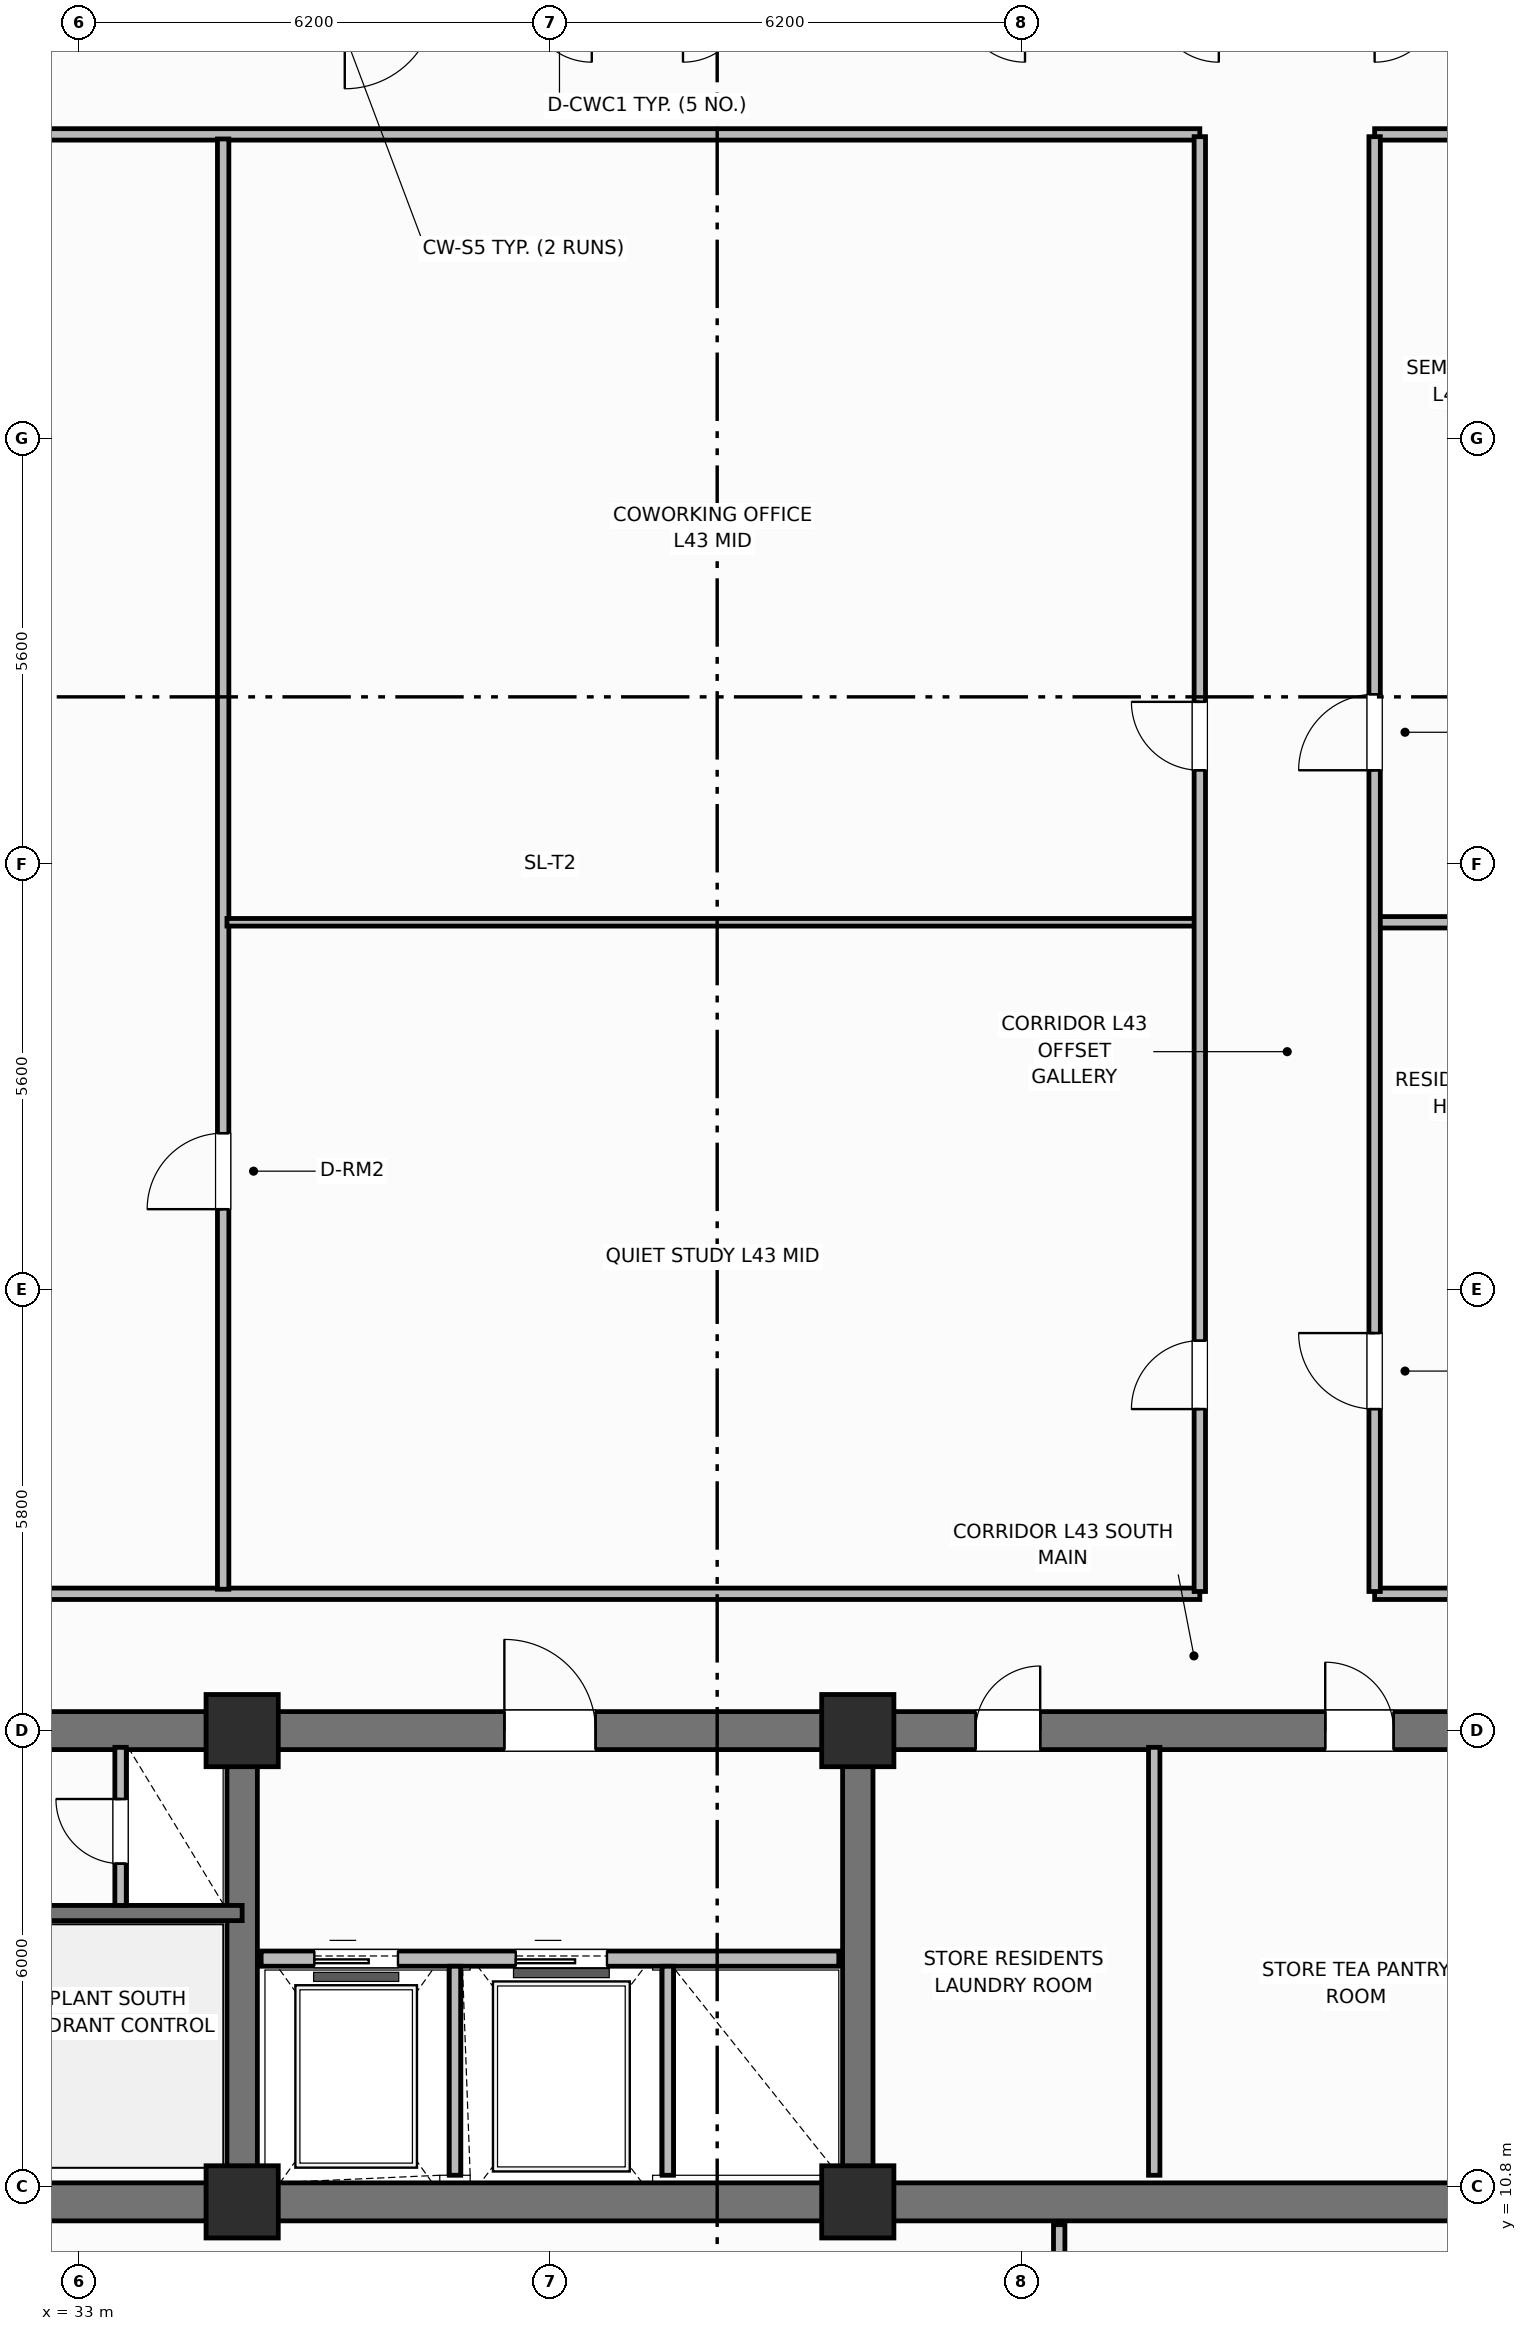
"""IFC4 building model, lengths in metres.
Left out: names, types, materials, properties, quantities, classifications, styles, units other than length and angle.
Written with IfcOpenShell. Run it as: python <this file> out.ifc"""

import sys

from ifc_helpers import new_model, si_unit, direction, frame, frame_2d, origin, origin_2d, place, context, subcontext, project, spatial, rectangle, extrude, element, fill, save


model = new_model("IFC4")
c1 = context("Model", 3, precision=1e-05, world=origin(), true_north=direction((0.0, 1.0)))
c2 = subcontext(c1, "Body", "Model", "MODEL_VIEW")
j1 = project(units=[si_unit("LENGTHUNIT", "METRE"), si_unit("PLANEANGLEUNIT", "RADIAN")], contexts=[c1])
p1 = place(None, origin())
s1 = spatial("IfcSite", under=j1, at=p1, CompositionType="ELEMENT")
p2 = place(p1, origin())
s2 = spatial("IfcBuilding", under=s1, at=p2, CompositionType="ELEMENT")
p3 = place(p2, frame((0.0, 0.0, 173.7)))
s3 = spatial("IfcBuildingStorey", under=s2, at=p3, CompositionType="ELEMENT", Elevation=173.7)
p4 = place(p3, frame((52.8, 10.6, 0.0), z_axis=(0.0, 0.0, 1.0), x_axis=(-1.0, 0.0, 0.0)))
e1 = element("IfcWall", 1, at=p4, inside=s3, PredefinedType="SHEAR", context=c2, shape_type="SweptSolid", body=[
    extrude(rectangle(XDim=27.2, YDim=0.5, at=frame_2d((13.6, 0.0))), origin(), (0.0, 0.0, 1.0), 3.7),
])
p5 = place(p3, frame((25.6, 16.8, 0.0), z_axis=(0.0, 0.0, 1.0), x_axis=(1.0, 0.0, 0.0)))
e2 = element("IfcWall", 2, at=p5, inside=s3, PredefinedType="SHEAR", context=c2, shape_type="SweptSolid", body=[
    extrude(rectangle(XDim=27.2, YDim=0.5, at=frame_2d((13.6, 0.0))), origin(), (0.0, 0.0, 1.0), 3.7),
])
p6 = place(p5, frame((1.8, 0.0, 0.0)))
e3 = element("IfcOpeningElement", 3, at=p6, cuts=e2, PredefinedType="OPENING", context=c2, shape_type="SweptSolid", body=[
    extrude(rectangle(XDim=1.1, YDim=2.15, at=frame_2d((0.55, 1.075))), frame((0.0, 0.26, 0.0), z_axis=(0.0, -1.0, 0.0), x_axis=(1.0, 0.0, 0.0)), (0.0, 0.0, 1.0), 0.52),
])
p7 = place(p5, frame((5.6, 0.0, 0.0)))
e4 = element("IfcOpeningElement", 4, at=p7, cuts=e2, PredefinedType="OPENING", context=c2, shape_type="SweptSolid", body=[
    extrude(rectangle(XDim=0.85, YDim=2.1, at=frame_2d((0.425, 1.05))), frame((0.0, 0.26, 0.0), z_axis=(0.0, -1.0, 0.0), x_axis=(1.0, 0.0, 0.0)), (0.0, 0.0, 1.0), 0.52),
])
p8 = place(p5, frame((13.0, 0.0, 0.0)))
e5 = element("IfcOpeningElement", 5, at=p8, cuts=e2, PredefinedType="OPENING", context=c2, shape_type="SweptSolid", body=[
    extrude(rectangle(XDim=1.2, YDim=2.15, at=frame_2d((0.6, 1.075))), frame((0.0, 0.26, 0.0), z_axis=(0.0, -1.0, 0.0), x_axis=(1.0, 0.0, 0.0)), (0.0, 0.0, 1.0), 0.52),
])
p9 = place(p5, frame((19.2, 0.0, 0.0)))
e6 = element("IfcOpeningElement", 6, at=p9, cuts=e2, PredefinedType="OPENING", context=c2, shape_type="SweptSolid", body=[
    extrude(rectangle(XDim=0.85, YDim=2.1, at=frame_2d((0.425, 1.05))), frame((0.0, 0.26, 0.0), z_axis=(0.0, -1.0, 0.0), x_axis=(1.0, 0.0, 0.0)), (0.0, 0.0, 1.0), 0.52),
])
p10 = place(p5, frame((23.8, 0.0, 0.0)))
e7 = element("IfcOpeningElement", 7, at=p10, cuts=e2, PredefinedType="OPENING", context=c2, shape_type="SweptSolid", body=[
    extrude(rectangle(XDim=0.9, YDim=2.1, at=frame_2d((0.45, 1.05))), frame((0.0, 0.26, 0.0), z_axis=(0.0, -1.0, 0.0), x_axis=(1.0, 0.0, 0.0)), (0.0, 0.0, 1.0), 0.52),
])
for number, where, z_axis, x_axis in (
    (8, (35.15, 10.85, 0.0), (0.0, 0.0, 1.0), (0.0, 1.0, 0.0)),
    (9, (43.25, 10.85, 0.0), (0.0, 0.0, 1.0), (0.0, 1.0, 0.0)),
):
    element("IfcWall", number, at=place(p3, frame(where, z_axis=z_axis, x_axis=x_axis)), inside=s3, PredefinedType="SHEAR", context=c2, shape_type="SweptSolid", body=[
        extrude(rectangle(XDim=5.7, YDim=0.4, at=frame_2d((2.85, 0.0))), origin(), (0.0, 0.0, 1.0), 3.7),
    ])
for number, where, z_axis, x_axis in (
    (10, (35.15, 10.6, 0.0), (0.0, 0.0, 1.0), (1.0, 0.0, 0.0)),
    (11, (35.15, 16.8, 0.0), (0.0, 0.0, 1.0), (1.0, 0.0, 0.0)),
    (12, (43.25, 10.6, 0.0), (0.0, 0.0, 1.0), (1.0, 0.0, 0.0)),
    (13, (43.25, 16.8, 0.0), (0.0, 0.0, 1.0), (1.0, 0.0, 0.0)),
):
    element("IfcColumn", number, at=place(p3, frame(where, z_axis=z_axis, x_axis=x_axis)), inside=s3, PredefinedType="COLUMN", context=c2, shape_type="SweptSolid", body=[
        extrude(rectangle(XDim=0.95, YDim=0.95, at=origin_2d()), origin(), (0.0, 0.0, 1.0), 3.7),
    ])
p11 = place(p3, frame((25.6, 14.4, 0.0), z_axis=(0.0, 0.0, 1.0), x_axis=(1.0, 0.0, 0.0)))
e14 = element("IfcWall", 14, at=p11, inside=s3, PredefinedType="SHEAR", context=c2, shape_type="SweptSolid", body=[
    extrude(rectangle(XDim=9.55, YDim=0.2, at=frame_2d((4.775, 0.0))), origin(), (0.0, 0.0, 1.0), 3.7),
])
p12 = place(p11, frame((1.05, 0.0, 0.0)))
e15 = element("IfcOpeningElement", 15, at=p12, cuts=e14, PredefinedType="OPENING", context=c2, shape_type="SweptSolid", body=[
    extrude(rectangle(XDim=1.1, YDim=2.15, at=frame_2d((0.55, 1.075))), frame((0.0, 0.11, 0.0), z_axis=(0.0, -1.0, 0.0), x_axis=(1.0, 0.0, 0.0)), (0.0, 0.0, 1.0), 0.22),
])
p13 = place(p3, frame((33.55, 14.5, 0.0), z_axis=(0.0, 0.0, 1.0), x_axis=(0.0, 1.0, 0.0)))
e16 = element("IfcWall", 16, at=p13, inside=s3, PredefinedType="PARTITIONING", context=c2, shape_type="SweptSolid", body=[
    extrude(rectangle(XDim=2.08, YDim=0.15, at=frame_2d((1.04, 0.0))), origin(), (0.0, 0.0, 1.0), 2.55),
])
p14 = place(p13, frame((0.55, 0.0, 0.0)))
e17 = element("IfcOpeningElement", 17, at=p14, cuts=e16, PredefinedType="OPENING", context=c2, shape_type="SweptSolid", body=[
    extrude(rectangle(XDim=0.85, YDim=2.05, at=frame_2d((0.425, 1.025))), frame((0.0, 0.085, 0.0), z_axis=(0.0, -1.0, 0.0), x_axis=(1.0, 0.0, 0.0)), (0.0, 0.0, 1.0), 0.17),
])
p15 = place(p3, frame((35.4, 13.8, 0.0), z_axis=(0.0, 0.0, 1.0), x_axis=(1.0, 0.0, 0.0)))
e18 = element("IfcWall", 18, at=p15, inside=s3, PredefinedType="PARTITIONING", context=c2, shape_type="SweptSolid", body=[
    extrude(rectangle(XDim=7.6, YDim=0.2, at=frame_2d((3.8, 0.0))), origin(), (0.0, 0.0, 1.0), 2.32),
])
p16 = place(p15, frame((0.7, 0.0, 0.0)))
e19 = element("IfcOpeningElement", 19, at=p16, cuts=e18, PredefinedType="OPENING", context=c2, shape_type="SweptSolid", body=[
    extrude(rectangle(XDim=1.1, YDim=2.15, at=frame_2d((0.55, 1.075))), frame((0.0, 0.11, 0.0), z_axis=(0.0, -1.0, 0.0), x_axis=(1.0, 0.0, 0.0)), (0.0, 0.0, 1.0), 0.22),
])
p17 = place(p15, frame((3.35, 0.0, 0.0)))
e20 = element("IfcOpeningElement", 20, at=p17, cuts=e18, PredefinedType="OPENING", context=c2, shape_type="SweptSolid", body=[
    extrude(rectangle(XDim=1.2, YDim=2.15, at=frame_2d((0.6, 1.075))), frame((0.0, 0.11, 0.0), z_axis=(0.0, -1.0, 0.0), x_axis=(1.0, 0.0, 0.0)), (0.0, 0.0, 1.0), 0.22),
])
for number, where, z_axis, x_axis in (
    (21, (37.95, 10.95, 0.0), (0.0, 0.0, 1.0), (0.0, 1.0, 0.0)),
    (22, (40.75, 10.95, 0.0), (0.0, 0.0, 1.0), (0.0, 1.0, 0.0)),
):
    element("IfcWall", number, at=place(p3, frame(where, z_axis=z_axis, x_axis=x_axis)), inside=s3, PredefinedType="PARTITIONING", context=c2, shape_type="SweptSolid", body=[
        extrude(rectangle(XDim=2.75, YDim=0.15, at=frame_2d((1.375, 0.0))), origin(), (0.0, 0.0, 1.0), 2.55),
    ])
p18 = place(p3, frame((47.15, 10.95, 0.0), z_axis=(0.0, 0.0, 1.0), x_axis=(0.0, 1.0, 0.0)))
e23 = element("IfcWall", 23, at=p18, inside=s3, PredefinedType="PARTITIONING", context=c2, shape_type="SweptSolid", body=[
    extrude(rectangle(XDim=5.63, YDim=0.15, at=frame_2d((2.815, 0.0))), origin(), (0.0, 0.0, 1.0), 2.55),
])
p19 = place(p3, frame((25.55, 18.6, 0.0), z_axis=(0.0, 0.0, 1.0), x_axis=(1.0, 0.0, 0.0)))
e24 = element("IfcWall", 24, at=p19, inside=s3, PredefinedType="PARTITIONING", context=c2, shape_type="SweptSolid", body=[
    extrude(rectangle(XDim=22.2, YDim=0.15, at=frame_2d((11.1, 0.0))), origin(), (0.0, 0.0, 1.0), 2.55),
])
p20 = place(p3, frame((50.05, 18.6, 0.0), z_axis=(0.0, 0.0, 1.0), x_axis=(1.0, 0.0, 0.0)))
e25 = element("IfcWall", 25, at=p20, inside=s3, PredefinedType="PARTITIONING", context=c2, shape_type="SweptSolid", body=[
    extrude(rectangle(XDim=2.8, YDim=0.15, at=frame_2d((1.4, 0.0))), origin(), (0.0, 0.0, 1.0), 2.55),
])
p21 = place(p3, frame((25.55, 37.8, 0.0), z_axis=(0.0, 0.0, 1.0), x_axis=(1.0, 0.0, 0.0)))
e26 = element("IfcWall", 26, at=p21, inside=s3, PredefinedType="PARTITIONING", context=c2, shape_type="SweptSolid", body=[
    extrude(rectangle(XDim=22.2, YDim=0.15, at=frame_2d((11.1, 0.0))), origin(), (0.0, 0.0, 1.0), 2.55),
])
p22 = place(p3, frame((50.05, 37.8, 0.0), z_axis=(0.0, 0.0, 1.0), x_axis=(1.0, 0.0, 0.0)))
e27 = element("IfcWall", 27, at=p22, inside=s3, PredefinedType="PARTITIONING", context=c2, shape_type="SweptSolid", body=[
    extrude(rectangle(XDim=2.8, YDim=0.15, at=frame_2d((1.4, 0.0))), origin(), (0.0, 0.0, 1.0), 2.55),
])
p23 = place(p3, frame((34.9, 18.66, 0.0), z_axis=(0.0, 0.0, 1.0), x_axis=(0.0, 1.0, 0.0)))
e28 = element("IfcWall", 28, at=p23, inside=s3, PredefinedType="PARTITIONING", context=c2, shape_type="SweptSolid", body=[
    extrude(rectangle(XDim=19.08, YDim=0.15, at=frame_2d((9.54, 0.0))), origin(), (0.0, 0.0, 1.0), 2.55),
])
p24 = place(p23, frame((5.0, 0.0, 0.0)))
e29 = element("IfcOpeningElement", 29, at=p24, cuts=e28, PredefinedType="OPENING", context=c2, shape_type="SweptSolid", body=[
    extrude(rectangle(XDim=1.0, YDim=2.15, at=frame_2d((0.5, 1.075))), frame((0.0, 0.085, 0.0), z_axis=(0.0, -1.0, 0.0), x_axis=(1.0, 0.0, 0.0)), (0.0, 0.0, 1.0), 0.17),
])
p25 = place(p3, frame((34.95, 27.434, 0.0), z_axis=(0.0, 0.0, 1.0), x_axis=(1.0, 0.0, 0.0)))
e30 = element("IfcWall", 30, at=p25, inside=s3, PredefinedType="PARTITIONING", context=c2, shape_type="SweptSolid", body=[
    extrude(rectangle(XDim=12.81, YDim=0.1, at=frame_2d((6.405, 0.0))), origin(), (0.0, 0.0, 1.0), 2.55),
])
p26 = place(p3, frame((50.08, 27.434, 0.0), z_axis=(0.0, 0.0, 1.0), x_axis=(1.0, 0.0, 0.0)))
e31 = element("IfcWall", 31, at=p26, inside=s3, PredefinedType="PARTITIONING", context=c2, shape_type="SweptSolid", body=[
    extrude(rectangle(XDim=2.72, YDim=0.15, at=frame_2d((1.36, 0.0))), origin(), (0.0, 0.0, 1.0), 2.55),
])
p27 = place(p3, frame((47.75, 18.63, 0.0), z_axis=(0.0, 0.0, 1.0), x_axis=(0.0, 1.0, 0.0)))
e32 = element("IfcWall", 32, at=p27, inside=s3, PredefinedType="PARTITIONING", context=c2, shape_type="SweptSolid", body=[
    extrude(rectangle(XDim=19.14, YDim=0.15, at=frame_2d((9.57, 0.0))), origin(), (0.0, 0.0, 1.0), 2.55),
])
p28 = place(p27, frame((2.4, 0.0, 0.0)))
e33 = element("IfcOpeningElement", 33, at=p28, cuts=e32, PredefinedType="OPENING", context=c2, shape_type="SweptSolid", body=[
    extrude(rectangle(XDim=0.9, YDim=2.1, at=frame_2d((0.45, 1.05))), frame((0.0, 0.085, 0.0), z_axis=(0.0, -1.0, 0.0), x_axis=(1.0, 0.0, 0.0)), (0.0, 0.0, 1.0), 0.17),
])
p29 = place(p27, frame((10.804, 0.0, 0.0)))
e34 = element("IfcOpeningElement", 34, at=p29, cuts=e32, PredefinedType="OPENING", context=c2, shape_type="SweptSolid", body=[
    extrude(rectangle(XDim=0.9, YDim=2.1, at=frame_2d((0.45, 1.05))), frame((0.0, 0.085, 0.0), z_axis=(0.0, -1.0, 0.0), x_axis=(1.0, 0.0, 0.0)), (0.0, 0.0, 1.0), 0.17),
])
p30 = place(p3, frame((50.05, 18.63, 0.0), z_axis=(0.0, 0.0, 1.0), x_axis=(0.0, 1.0, 0.0)))
e35 = element("IfcWall", 35, at=p30, inside=s3, PredefinedType="PARTITIONING", context=c2, shape_type="SweptSolid", body=[
    extrude(rectangle(XDim=19.14, YDim=0.15, at=frame_2d((9.57, 0.0))), origin(), (0.0, 0.0, 1.0), 2.55),
])
p31 = place(p30, frame((2.4, 0.0, 0.0)))
e36 = element("IfcOpeningElement", 36, at=p31, cuts=e35, PredefinedType="OPENING", context=c2, shape_type="SweptSolid", body=[
    extrude(rectangle(XDim=1.0, YDim=2.15, at=frame_2d((0.5, 1.075))), frame((0.0, 0.085, 0.0), z_axis=(0.0, -1.0, 0.0), x_axis=(1.0, 0.0, 0.0)), (0.0, 0.0, 1.0), 0.17),
])
p32 = place(p30, frame((10.804, 0.0, 0.0)))
e37 = element("IfcOpeningElement", 37, at=p32, cuts=e35, PredefinedType="OPENING", context=c2, shape_type="SweptSolid", body=[
    extrude(rectangle(XDim=1.0, YDim=2.15, at=frame_2d((0.5, 1.075))), frame((0.0, 0.085, 0.0), z_axis=(0.0, -1.0, 0.0), x_axis=(1.0, 0.0, 0.0)), (0.0, 0.0, 1.0), 0.17),
])
p33 = place(p3, frame((45.9, 6.87, 0.0), z_axis=(0.0, 0.0, 1.0), x_axis=(0.0, 1.0, 0.0)))
e38 = element("IfcWall", 38, at=p33, inside=s3, PredefinedType="PARTITIONING", context=c2, shape_type="SweptSolid", body=[
    extrude(rectangle(XDim=3.43, YDim=0.15, at=frame_2d((1.715, 0.0))), origin(), (0.0, 0.0, 1.0), 2.55),
])
p34 = place(p14, origin())
e39 = element("IfcDoor", 39, at=p34, inside=s3, OperationType="SINGLE_SWING_RIGHT", PredefinedType="TRAPDOOR", context=c2, shape_type="SweptSolid", body=[
    extrude(rectangle(XDim=0.85, YDim=2.05, at=frame_2d((0.425, 1.025))), frame((0.0, 0.025, 0.0), z_axis=(0.0, -1.0, 0.0), x_axis=(1.0, 0.0, 0.0)), (0.0, 0.0, 1.0), 0.05),
])
fill(e17, e39)
p35 = place(p16, origin())
e40 = element("IfcDoor", 40, at=p35, inside=s3, OperationType="SLIDING_TO_LEFT", PredefinedType="DOOR", context=c2, shape_type="SweptSolid", body=[
    extrude(rectangle(XDim=1.1, YDim=2.15, at=frame_2d((0.55, 1.075))), frame((0.0, 0.025, 0.0), z_axis=(0.0, -1.0, 0.0), x_axis=(1.0, 0.0, 0.0)), (0.0, 0.0, 1.0), 0.05),
])
fill(e19, e40)
p36 = place(p17, origin())
e41 = element("IfcDoor", 41, at=p36, inside=s3, OperationType="SLIDING_TO_LEFT", PredefinedType="DOOR", context=c2, shape_type="SweptSolid", body=[
    extrude(rectangle(XDim=1.2, YDim=2.15, at=frame_2d((0.6, 1.075))), frame((0.0, 0.025, 0.0), z_axis=(0.0, -1.0, 0.0), x_axis=(1.0, 0.0, 0.0)), (0.0, 0.0, 1.0), 0.05),
])
fill(e20, e41)
p37 = place(p24, origin())
e42 = element("IfcDoor", 42, at=p37, inside=s3, OperationType="SINGLE_SWING_LEFT", PredefinedType="DOOR", context=c2, shape_type="SweptSolid", body=[
    extrude(rectangle(XDim=1.0, YDim=2.15, at=frame_2d((0.5, 1.075))), frame((0.0, 0.025, 0.0), z_axis=(0.0, -1.0, 0.0), x_axis=(1.0, 0.0, 0.0)), (0.0, 0.0, 1.0), 0.05),
])
fill(e29, e42)
p38 = place(p28, origin())
e43 = element("IfcDoor", 43, at=p38, inside=s3, OperationType="SINGLE_SWING_LEFT", PredefinedType="DOOR", context=c2, shape_type="SweptSolid", body=[
    extrude(rectangle(XDim=0.9, YDim=2.1, at=frame_2d((0.45, 1.05))), frame((0.0, 0.025, 0.0), z_axis=(0.0, -1.0, 0.0), x_axis=(1.0, 0.0, 0.0)), (0.0, 0.0, 1.0), 0.05),
])
fill(e33, e43)
p39 = place(p29, origin())
e44 = element("IfcDoor", 44, at=p39, inside=s3, OperationType="SINGLE_SWING_RIGHT", PredefinedType="DOOR", context=c2, shape_type="SweptSolid", body=[
    extrude(rectangle(XDim=0.9, YDim=2.1, at=frame_2d((0.45, 1.05))), frame((0.0, 0.025, 0.0), z_axis=(0.0, -1.0, 0.0), x_axis=(1.0, 0.0, 0.0)), (0.0, 0.0, 1.0), 0.05),
])
fill(e34, e44)
p40 = place(p31, origin())
e45 = element("IfcDoor", 45, at=p40, inside=s3, OperationType="SINGLE_SWING_RIGHT", PredefinedType="DOOR", context=c2, shape_type="SweptSolid", body=[
    extrude(rectangle(XDim=1.0, YDim=2.15, at=frame_2d((0.5, 1.075))), frame((0.0, 0.025, 0.0), z_axis=(0.0, -1.0, 0.0), x_axis=(1.0, 0.0, 0.0)), (0.0, 0.0, 1.0), 0.05),
])
fill(e36, e45)
p41 = place(p32, origin())
e46 = element("IfcDoor", 46, at=p41, inside=s3, OperationType="SINGLE_SWING_LEFT", PredefinedType="DOOR", context=c2, shape_type="SweptSolid", body=[
    extrude(rectangle(XDim=1.0, YDim=2.15, at=frame_2d((0.5, 1.075))), frame((0.0, 0.025, 0.0), z_axis=(0.0, -1.0, 0.0), x_axis=(1.0, 0.0, 0.0)), (0.0, 0.0, 1.0), 0.05),
])
fill(e37, e46)
p42 = place(p8, origin())
e47 = element("IfcDoor", 47, at=p42, inside=s3, OperationType="SINGLE_SWING_LEFT", PredefinedType="DOOR", context=c2, shape_type="SweptSolid", body=[
    extrude(rectangle(XDim=1.2, YDim=2.15, at=frame_2d((0.6, 1.075))), frame((0.0, 0.025, 0.0), z_axis=(0.0, -1.0, 0.0), x_axis=(1.0, 0.0, 0.0)), (0.0, 0.0, 1.0), 0.05),
])
fill(e5, e47)
p43 = place(p9, origin())
e48 = element("IfcDoor", 48, at=p43, inside=s3, OperationType="SINGLE_SWING_RIGHT", PredefinedType="DOOR", context=c2, shape_type="SweptSolid", body=[
    extrude(rectangle(XDim=0.85, YDim=2.1, at=frame_2d((0.425, 1.05))), frame((0.0, 0.025, 0.0), z_axis=(0.0, -1.0, 0.0), x_axis=(1.0, 0.0, 0.0)), (0.0, 0.0, 1.0), 0.05),
])
fill(e6, e48)
p44 = place(p10, origin())
e49 = element("IfcDoor", 49, at=p44, inside=s3, OperationType="SINGLE_SWING_LEFT", PredefinedType="DOOR", context=c2, shape_type="SweptSolid", body=[
    extrude(rectangle(XDim=0.9, YDim=2.1, at=frame_2d((0.45, 1.05))), frame((0.0, 0.025, 0.0), z_axis=(0.0, -1.0, 0.0), x_axis=(1.0, 0.0, 0.0)), (0.0, 0.0, 1.0), 0.05),
])
fill(e7, e49)
save(model, sys.argv[1])
